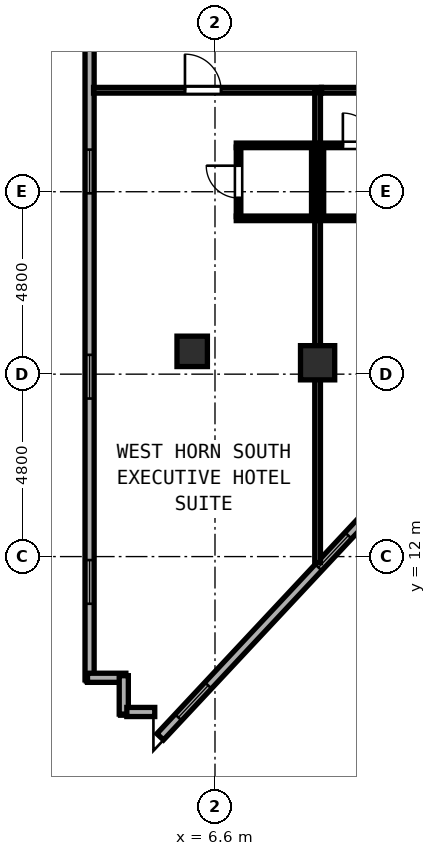
"""IFC4 building model, lengths in metres.
Left out: names, types, materials, properties, quantities, classifications, styles, units other than length and angle.
Written with IfcOpenShell. Run it as: python <this file> out.ifc"""

import sys

from ifc_helpers import new_model, si_unit, direction, frame, frame_2d, origin, origin_2d, place, context, subcontext, project, spatial, rectangle, hollow_rectangle, extrude, element, fill, save


model = new_model("IFC4")
c1 = context("Model", 3, precision=1e-05, world=origin(), true_north=direction((0.0, 1.0)))
c2 = subcontext(c1, "Body", "Model", "MODEL_VIEW")
j1 = project(units=[si_unit("LENGTHUNIT", "METRE"), si_unit("PLANEANGLEUNIT", "RADIAN")], contexts=[c1])
p1 = place(None, origin())
s1 = spatial("IfcSite", under=j1, at=p1, CompositionType="ELEMENT")
p2 = place(p1, origin())
s2 = spatial("IfcBuilding", under=s1, at=p2, CompositionType="ELEMENT")
p3 = place(p2, frame((0.0, 0.0, 98.4)))
s3 = spatial("IfcBuildingStorey", under=s2, at=p3, CompositionType="ELEMENT", Elevation=98.4)
p4 = place(p3, frame((6.0, 17.4, 0.0), z_axis=(0.0, 0.0, 1.0), x_axis=(1.0, 0.0, 0.0)))
e1 = element("IfcColumn", 1, at=p4, inside=s3, PredefinedType="COLUMN", context=c2, shape_type="SweptSolid", body=[
    extrude(hollow_rectangle(XDim=0.8, YDim=0.8, WallThickness=0.03, at=origin_2d()), origin(), (0.0, 0.0, 1.0), 3.8),
])
p5 = place(p3, frame((9.3, 17.1, 0.0), z_axis=(0.0, 0.0, 1.0), x_axis=(1.0, 0.0, 0.0)))
e2 = element("IfcColumn", 2, at=p5, inside=s3, PredefinedType="COLUMN", context=c2, shape_type="SweptSolid", body=[
    extrude(hollow_rectangle(XDim=0.9, YDim=0.9, WallThickness=0.034, at=origin_2d()), origin(), (0.0, 0.0, 1.0), 3.8),
])
p6 = place(p3, frame((3.3, 28.808, 0.0), z_axis=(0.0, 0.0, 1.0), x_axis=(0.0, -1.0, 0.0)))
e3 = element("IfcWall", 3, at=p6, inside=s3, PredefinedType="SOLIDWALL", context=c2, shape_type="SweptSolid", body=[
    extrude(rectangle(XDim=20.052, YDim=0.24, at=frame_2d((10.026, 0.0))), origin(), (0.0, 0.0, 1.0), 3.6),
])
p7 = place(p6, frame((0.7, 0.0, 0.85)))
e4 = element("IfcOpeningElement", 4, at=p7, cuts=e3, PredefinedType="OPENING", context=c2, shape_type="SweptSolid", body=[
    extrude(rectangle(XDim=1.15, YDim=1.8, at=frame_2d((0.575, 0.9))), frame((0.0, 0.13, 0.0), z_axis=(0.0, -1.0, 0.0), x_axis=(1.0, 0.0, 0.0)), (0.0, 0.0, 1.0), 0.26),
])
p8 = place(p6, frame((6.1, 0.0, 0.85)))
e5 = element("IfcOpeningElement", 5, at=p8, cuts=e3, PredefinedType="OPENING", context=c2, shape_type="SweptSolid", body=[
    extrude(rectangle(XDim=1.15, YDim=1.8, at=frame_2d((0.575, 0.9))), frame((0.0, 0.13, 0.0), z_axis=(0.0, -1.0, 0.0), x_axis=(1.0, 0.0, 0.0)), (0.0, 0.0, 1.0), 0.26),
])
p9 = place(p6, frame((11.5, 0.0, 0.85)))
e6 = element("IfcOpeningElement", 6, at=p9, cuts=e3, PredefinedType="OPENING", context=c2, shape_type="SweptSolid", body=[
    extrude(rectangle(XDim=1.15, YDim=1.8, at=frame_2d((0.575, 0.9))), frame((0.0, 0.13, 0.0), z_axis=(0.0, -1.0, 0.0), x_axis=(1.0, 0.0, 0.0)), (0.0, 0.0, 1.0), 0.26),
])
p10 = place(p6, frame((16.9, 0.0, 0.85)))
e7 = element("IfcOpeningElement", 7, at=p10, cuts=e3, PredefinedType="OPENING", context=c2, shape_type="SweptSolid", body=[
    extrude(rectangle(XDim=1.15, YDim=1.8, at=frame_2d((0.575, 0.9))), frame((0.0, 0.13, 0.0), z_axis=(0.0, -1.0, 0.0), x_axis=(1.0, 0.0, 0.0)), (0.0, 0.0, 1.0), 0.26),
])
p11 = place(p3, frame((3.245, 8.811, 0.0), z_axis=(0.0, 0.0, 1.0), x_axis=(1.0, 0.0, 0.0)))
e8 = element("IfcWall", 8, at=p11, inside=s3, PredefinedType="SOLIDWALL", context=c2, shape_type="SweptSolid", body=[
    extrude(rectangle(XDim=1.01, YDim=0.24, at=frame_2d((0.505, 0.0))), origin(), (0.0, 0.0, 1.0), 3.6),
])
p12 = place(p3, frame((4.2, 8.866, 0.0), z_axis=(0.0, 0.0, 1.0), x_axis=(0.0, -1.0, 0.0)))
e9 = element("IfcWall", 9, at=p12, inside=s3, PredefinedType="SOLIDWALL", context=c2, shape_type="SweptSolid", body=[
    extrude(rectangle(XDim=1.01, YDim=0.24, at=frame_2d((0.505, 0.0))), origin(), (0.0, 0.0, 1.0), 3.6),
])
p13 = place(p3, frame((4.28, 7.911, 0.0), z_axis=(0.0, 0.0, 1.0), x_axis=(1.0, 0.0, 0.0)))
e10 = element("IfcWall", 10, at=p13, inside=s3, PredefinedType="SOLIDWALL", context=c2, shape_type="SweptSolid", body=[
    extrude(rectangle(XDim=0.735, YDim=0.24, at=frame_2d((0.367, 0.0))), origin(), (0.0, 0.0, 1.0), 3.6),
])
p14 = place(p3, frame((5.158, 7.257, 0.0), z_axis=(0.0, 0.0, 1.0), x_axis=(0.68291649943, 0.730496444075, 0.0)))
e11 = element("IfcWall", 11, at=p14, inside=s3, PredefinedType="SOLIDWALL", context=c2, shape_type="SweptSolid", body=[
    extrude(rectangle(XDim=9.898, YDim=0.24, at=frame_2d((4.949, 0.0))), origin(), (0.0, 0.0, 1.0), 3.6),
])
p15 = place(p14, frame((0.7, 0.0, 0.85)))
e12 = element("IfcOpeningElement", 12, at=p15, cuts=e11, PredefinedType="OPENING", context=c2, shape_type="SweptSolid", body=[
    extrude(rectangle(XDim=1.15, YDim=1.8, at=frame_2d((0.575, 0.9))), frame((0.0, 0.13, 0.0), z_axis=(0.0, -1.0, 0.0), x_axis=(1.0, 0.0, 0.0)), (0.0, 0.0, 1.0), 0.26),
])
p16 = place(p14, frame((6.1, 0.0, 0.85)))
e13 = element("IfcOpeningElement", 13, at=p16, cuts=e11, PredefinedType="OPENING", context=c2, shape_type="SweptSolid", body=[
    extrude(rectangle(XDim=1.15, YDim=1.8, at=frame_2d((0.575, 0.9))), frame((0.0, 0.13, 0.0), z_axis=(0.0, -1.0, 0.0), x_axis=(1.0, 0.0, 0.0)), (0.0, 0.0, 1.0), 0.26),
])
p17 = place(p3, frame((3.405, 24.27, 0.0), z_axis=(0.0, 0.0, 1.0), x_axis=(1.0, 0.0, 0.0)))
e14 = element("IfcWall", 14, at=p17, inside=s3, PredefinedType="PARTITIONING", context=c2, shape_type="SweptSolid", body=[
    extrude(rectangle(XDim=5.995, YDim=0.15, at=frame_2d((2.998, 0.0))), origin(), (0.0, 0.0, 1.0), 3.6),
])
p18 = place(p17, frame((3.355, 0.0, 0.0), z_axis=(0.0, 0.0, 1.0), x_axis=(-1.0, 0.0, 0.0)))
e15 = element("IfcOpeningElement", 15, at=p18, cuts=e14, PredefinedType="OPENING", context=c2, shape_type="SweptSolid", body=[
    extrude(rectangle(XDim=0.95, YDim=2.18, at=frame_2d((0.475, 1.09))), frame((0.0, 0.085, 0.0), z_axis=(0.0, -1.0, 0.0), x_axis=(1.0, 0.0, 0.0)), (0.0, 0.0, 1.0), 0.17),
])
p19 = place(p3, frame((9.3, 11.841, 0.0), z_axis=(0.0, 0.0, 1.0), x_axis=(0.0, 1.0, 0.0)))
e16 = element("IfcWall", 16, at=p19, inside=s3, PredefinedType="PARTITIONING", context=c2, shape_type="SweptSolid", body=[
    extrude(rectangle(XDim=12.369, YDim=0.15, at=frame_2d((6.184, 0.0))), origin(), (0.0, 0.0, 1.0), 3.6),
])
for number, where, z_axis, x_axis in (
    (17, (7.16, 22.82, 0.0), (0.0, 0.0, 1.0), (1.0, 0.0, 0.0)),
    (18, (7.16, 20.9, 0.0), (0.0, 0.0, 1.0), (1.0, 0.0, 0.0)),
):
    element("IfcWall", number, at=place(p3, frame(where, z_axis=z_axis, x_axis=x_axis)), inside=s3, PredefinedType="PARTITIONING", context=c2, shape_type="SweptSolid", body=[
        extrude(rectangle(XDim=2.08, YDim=0.12, at=frame_2d((1.04, 0.0))), origin(), (0.0, 0.0, 1.0), 3.6),
    ])
p20 = place(p3, frame((7.22, 20.945, 0.0), z_axis=(0.0, 0.0, 1.0), x_axis=(0.0, 1.0, 0.0)))
e19 = element("IfcWall", 19, at=p20, inside=s3, PredefinedType="PARTITIONING", context=c2, shape_type="SweptSolid", body=[
    extrude(rectangle(XDim=1.83, YDim=0.12, at=frame_2d((0.915, 0.0))), origin(), (0.0, 0.0, 1.0), 3.6),
])
p21 = place(p20, frame((1.34, 0.0, 0.0), z_axis=(0.0, 0.0, 1.0), x_axis=(-1.0, 0.0, 0.0)))
e20 = element("IfcOpeningElement", 20, at=p21, cuts=e19, PredefinedType="OPENING", context=c2, shape_type="SweptSolid", body=[
    extrude(rectangle(XDim=0.85, YDim=2.1, at=frame_2d((0.425, 1.05))), frame((0.0, 0.07, 0.0), z_axis=(0.0, -1.0, 0.0), x_axis=(1.0, 0.0, 0.0)), (0.0, 0.0, 1.0), 0.14),
])
p22 = place(p3, frame((9.2, 20.945, 0.0), z_axis=(0.0, 0.0, 1.0), x_axis=(0.0, 1.0, 0.0)))
e21 = element("IfcWall", 21, at=p22, inside=s3, PredefinedType="PARTITIONING", context=c2, shape_type="SweptSolid", body=[
    extrude(rectangle(XDim=1.83, YDim=0.12, at=frame_2d((0.915, 0.0))), origin(), (0.0, 0.0, 1.0), 3.6),
])
p23 = place(p3, frame((9.402, 24.27, 0.0), z_axis=(0.0, 0.0, 1.0), x_axis=(1.0, 0.0, 0.0)))
e22 = element("IfcWall", 22, at=p23, inside=s3, PredefinedType="PARTITIONING", context=c2, shape_type="SweptSolid", body=[
    extrude(rectangle(XDim=2.296, YDim=0.15, at=frame_2d((1.148, 0.0))), origin(), (0.0, 0.0, 1.0), 3.6),
])
p24 = place(p23, frame((1.934, 0.0, 0.0), z_axis=(0.0, 0.0, 1.0), x_axis=(-1.0, 0.0, 0.0)))
e23 = element("IfcOpeningElement", 23, at=p24, cuts=e22, PredefinedType="OPENING", context=c2, shape_type="SweptSolid", body=[
    extrude(rectangle(XDim=0.95, YDim=2.15, at=frame_2d((0.475, 1.075))), frame((0.0, 0.085, 0.0), z_axis=(0.0, -1.0, 0.0), x_axis=(1.0, 0.0, 0.0)), (0.0, 0.0, 1.0), 0.17),
])
p25 = place(p3, frame((9.36, 22.82, 0.0), z_axis=(0.0, 0.0, 1.0), x_axis=(1.0, 0.0, 0.0)))
e24 = element("IfcWall", 24, at=p25, inside=s3, PredefinedType="PARTITIONING", context=c2, shape_type="SweptSolid", body=[
    extrude(rectangle(XDim=2.08, YDim=0.12, at=frame_2d((1.04, 0.0))), origin(), (0.0, 0.0, 1.0), 3.6),
])
p26 = place(p25, frame((1.455, 0.0, 0.0), z_axis=(0.0, 0.0, 1.0), x_axis=(-1.0, 0.0, 0.0)))
e25 = element("IfcOpeningElement", 25, at=p26, cuts=e24, PredefinedType="OPENING", context=c2, shape_type="SweptSolid", body=[
    extrude(rectangle(XDim=0.85, YDim=2.1, at=frame_2d((0.425, 1.05))), frame((0.0, 0.07, 0.0), z_axis=(0.0, -1.0, 0.0), x_axis=(1.0, 0.0, 0.0)), (0.0, 0.0, 1.0), 0.14),
])
p27 = place(p3, frame((9.36, 20.9, 0.0), z_axis=(0.0, 0.0, 1.0), x_axis=(1.0, 0.0, 0.0)))
e26 = element("IfcWall", 26, at=p27, inside=s3, PredefinedType="PARTITIONING", context=c2, shape_type="SweptSolid", body=[
    extrude(rectangle(XDim=2.08, YDim=0.12, at=frame_2d((1.04, 0.0))), origin(), (0.0, 0.0, 1.0), 3.6),
])
p28 = place(p3, frame((9.4, 20.945, 0.0), z_axis=(0.0, 0.0, 1.0), x_axis=(0.0, 1.0, 0.0)))
e27 = element("IfcWall", 27, at=p28, inside=s3, PredefinedType="PARTITIONING", context=c2, shape_type="SweptSolid", body=[
    extrude(rectangle(XDim=1.83, YDim=0.12, at=frame_2d((0.915, 0.0))), origin(), (0.0, 0.0, 1.0), 3.6),
])
p29 = place(p8, origin())
e28 = element("IfcWindow", 28, at=p29, inside=s3, PartitioningType="SINGLE_PANEL", PredefinedType="WINDOW", context=c2, shape_type="SweptSolid", body=[
    extrude(rectangle(XDim=1.15, YDim=1.8, at=frame_2d((0.575, 0.9))), frame((0.0, 0.03, 0.0), z_axis=(0.0, -1.0, 0.0), x_axis=(1.0, 0.0, 0.0)), (0.0, 0.0, 1.0), 0.06),
])
fill(e5, e28)
p30 = place(p9, origin())
e29 = element("IfcWindow", 29, at=p30, inside=s3, PartitioningType="SINGLE_PANEL", PredefinedType="WINDOW", context=c2, shape_type="SweptSolid", body=[
    extrude(rectangle(XDim=1.15, YDim=1.8, at=frame_2d((0.575, 0.9))), frame((0.0, 0.03, 0.0), z_axis=(0.0, -1.0, 0.0), x_axis=(1.0, 0.0, 0.0)), (0.0, 0.0, 1.0), 0.06),
])
fill(e6, e29)
p31 = place(p10, origin())
e30 = element("IfcWindow", 30, at=p31, inside=s3, PartitioningType="SINGLE_PANEL", PredefinedType="WINDOW", context=c2, shape_type="SweptSolid", body=[
    extrude(rectangle(XDim=1.15, YDim=1.8, at=frame_2d((0.575, 0.9))), frame((0.0, 0.03, 0.0), z_axis=(0.0, -1.0, 0.0), x_axis=(1.0, 0.0, 0.0)), (0.0, 0.0, 1.0), 0.06),
])
fill(e7, e30)
p32 = place(p15, origin())
e31 = element("IfcWindow", 31, at=p32, inside=s3, PartitioningType="SINGLE_PANEL", PredefinedType="WINDOW", context=c2, shape_type="SweptSolid", body=[
    extrude(rectangle(XDim=1.15, YDim=1.8, at=frame_2d((0.575, 0.9))), frame((0.0, 0.03, 0.0), z_axis=(0.0, -1.0, 0.0), x_axis=(1.0, 0.0, 0.0)), (0.0, 0.0, 1.0), 0.06),
])
fill(e12, e31)
p33 = place(p16, origin())
e32 = element("IfcWindow", 32, at=p33, inside=s3, PartitioningType="SINGLE_PANEL", PredefinedType="WINDOW", context=c2, shape_type="SweptSolid", body=[
    extrude(rectangle(XDim=1.15, YDim=1.8, at=frame_2d((0.575, 0.9))), frame((0.0, 0.03, 0.0), z_axis=(0.0, -1.0, 0.0), x_axis=(1.0, 0.0, 0.0)), (0.0, 0.0, 1.0), 0.06),
])
fill(e13, e32)
p34 = place(p18, origin())
e33 = element("IfcDoor", 33, at=p34, inside=s3, OperationType="SINGLE_SWING_RIGHT", PredefinedType="DOOR", context=c2, shape_type="SweptSolid", body=[
    extrude(rectangle(XDim=0.95, YDim=2.18, at=frame_2d((0.475, 1.09))), frame((0.0, 0.025, 0.0), z_axis=(0.0, -1.0, 0.0), x_axis=(1.0, 0.0, 0.0)), (0.0, 0.0, 1.0), 0.05),
])
fill(e15, e33)
p35 = place(p21, origin())
e34 = element("IfcDoor", 34, at=p35, inside=s3, OperationType="SINGLE_SWING_LEFT", PredefinedType="DOOR", context=c2, shape_type="SweptSolid", body=[
    extrude(rectangle(XDim=0.85, YDim=2.1, at=frame_2d((0.425, 1.05))), frame((0.0, 0.025, 0.0), z_axis=(0.0, -1.0, 0.0), x_axis=(1.0, 0.0, 0.0)), (0.0, 0.0, 1.0), 0.05),
])
fill(e20, e34)
p36 = place(p26, origin())
e35 = element("IfcDoor", 35, at=p36, inside=s3, OperationType="SINGLE_SWING_RIGHT", PredefinedType="DOOR", context=c2, shape_type="SweptSolid", body=[
    extrude(rectangle(XDim=0.85, YDim=2.1, at=frame_2d((0.425, 1.05))), frame((0.0, 0.025, 0.0), z_axis=(0.0, -1.0, 0.0), x_axis=(1.0, 0.0, 0.0)), (0.0, 0.0, 1.0), 0.05),
])
fill(e25, e35)
save(model, sys.argv[1])
